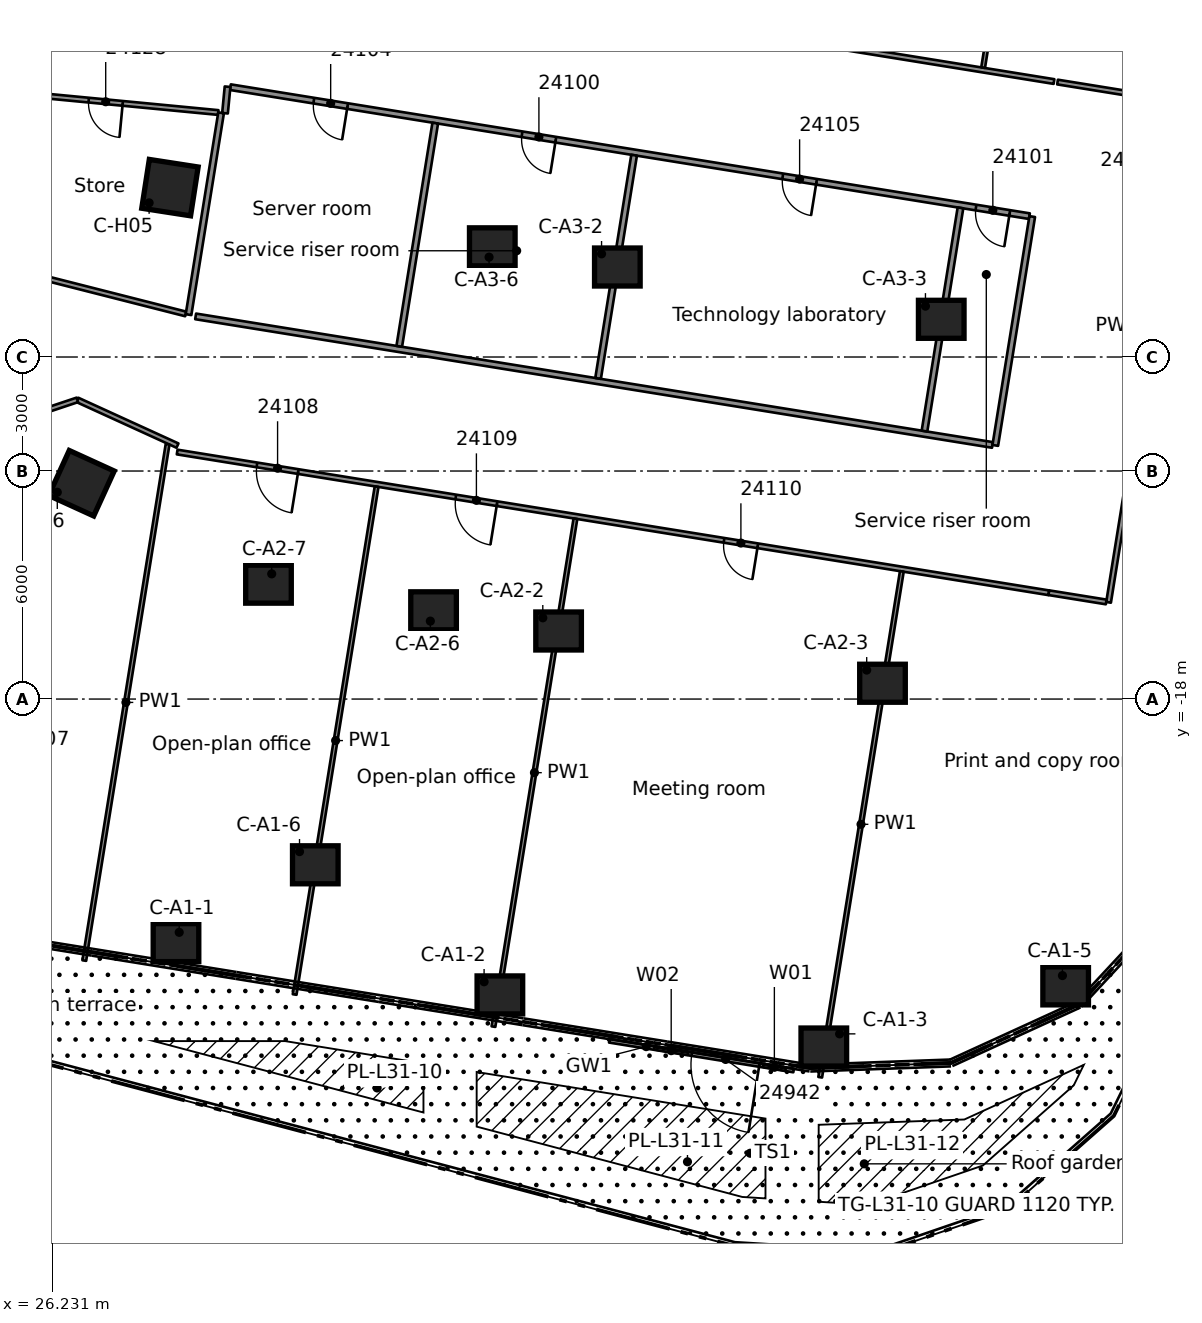
"""IFC4 building model, lengths in metres.
Left out: names, types, materials, properties, quantities, classifications, styles, units other than length and angle.
Written with IfcOpenShell. Run it as: python <this file> out.ifc"""

import sys

from ifc_helpers import new_model, si_unit, direction, frame, frame_2d, origin, origin_2d, place, context, subcontext, project, spatial, rectangle, extrude, element, fill, save


model = new_model("IFC4")
c1 = context("Model", 3, precision=1e-05, world=origin(), true_north=direction((0.0, 1.0)))
c2 = subcontext(c1, "Body", "Model", "MODEL_VIEW")
j1 = project(units=[si_unit("LENGTHUNIT", "METRE"), si_unit("PLANEANGLEUNIT", "RADIAN")], contexts=[c1])
p1 = place(None, origin())
s1 = spatial("IfcSite", under=j1, at=p1, CompositionType="ELEMENT")
p2 = place(p1, origin())
s2 = spatial("IfcBuilding", under=s1, at=p2, CompositionType="ELEMENT")
p3 = place(p2, frame((0.0, 0.0, 123.7)))
s3 = spatial("IfcBuildingStorey", under=s2, at=p3, CompositionType="ELEMENT", Elevation=123.7)
for number, where, z_axis, x_axis in (
    (1, (29.488, -24.409, 0.0), (0.0, 0.0, 1.0), (1.0, 0.0, 0.0)),
    (2, (38.011, -25.785, 0.0), (0.0, 0.0, 1.0), (1.0, 0.0, 0.0)),
    (3, (46.535, -27.156, 0.0), (0.0, 0.0, 1.0), (1.0, 0.0, 0.0)),
    (4, (52.899, -25.547, 0.0), (0.0, 0.0, 1.0), (1.0, 0.0, 0.0)),
    (5, (33.154, -22.361, 0.0), (0.0, 0.0, 1.0), (1.0, 0.0, 0.0)),
    (6, (39.556, -16.209, 0.0), (0.0, 0.0, 1.0), (1.0, 0.0, 0.0)),
    (7, (48.079, -17.584, 0.0), (0.0, 0.0, 1.0), (1.0, 0.0, 0.0)),
    (8, (36.266, -15.678, 0.0), (0.0, 0.0, 1.0), (1.0, 0.0, 0.0)),
    (9, (31.922, -14.977, 0.0), (0.0, 0.0, 1.0), (1.0, 0.0, 0.0)),
    (10, (41.102, -6.632, 0.0), (0.0, 0.0, 1.0), (1.0, 0.0, 0.0)),
    (11, (49.625, -8.008, 0.0), (0.0, 0.0, 1.0), (1.0, 0.0, 0.0)),
    (12, (37.811, -6.101, 0.0), (0.0, 0.0, 1.0), (1.0, 0.0, 0.0)),
):
    element("IfcColumn", number, at=place(p3, frame(where, z_axis=z_axis, x_axis=x_axis)), inside=s3, PredefinedType="COLUMN", context=c2, shape_type="SweptSolid", body=[
        extrude(rectangle(XDim=1.2, YDim=1.0, at=origin_2d()), origin(), (0.0, 0.0, 1.0), 3.5),
    ])
for number, where, z_axis, x_axis in (
    (13, (29.329, -4.543, 0.0), (0.0, 0.0, 1.0), (0.988, -0.153, 0.0)),
    (14, (27.001, -12.321, 0.0), (0.0, 0.0, 1.0), (0.91, -0.415, 0.0)),
):
    element("IfcColumn", number, at=place(p3, frame(where, z_axis=z_axis, x_axis=x_axis)), inside=s3, PredefinedType="COLUMN", context=c2, shape_type="SweptSolid", body=[
        extrude(rectangle(XDim=1.3, YDim=1.3, at=origin_2d()), origin(), (0.0, 0.0, 1.0), 3.5),
    ])
p4 = place(p3, frame((45.74, -27.771, 0.0), z_axis=(0.0, 0.0, 1.0), x_axis=(-0.987233559184, 0.159279313223, 0.0)))
e15 = element("IfcWall", 15, at=p4, inside=s3, PredefinedType="STANDARD", context=c2, shape_type="SweptSolid", body=[
    extrude(rectangle(XDim=4.913, YDim=0.1, at=frame_2d((2.456, 0.0))), origin(), (0.0, 0.0, 1.0), 3.1),
])
p5 = place(p4, frame((0.913, 0.0, 0.0)))
e16 = element("IfcOpeningElement", 16, at=p5, cuts=e15, PredefinedType="OPENING", context=c2, shape_type="SweptSolid", body=[
    extrude(rectangle(XDim=1.8, YDim=2.4, at=frame_2d((0.9, 1.2))), frame((0.0, 0.06, 0.0), z_axis=(0.0, -1.0, 0.0), x_axis=(1.0, 0.0, 0.0)), (0.0, 0.0, 1.0), 0.12),
])
p6 = place(p4, frame((0.213, 0.0, 0.0)))
e17 = element("IfcOpeningElement", 17, at=p6, cuts=e15, PredefinedType="OPENING", context=c2, shape_type="SweptSolid", body=[
    extrude(rectangle(XDim=0.6, YDim=2.4, at=frame_2d((0.3, 1.2))), frame((0.0, 0.06, 0.0), z_axis=(0.0, -1.0, 0.0), x_axis=(1.0, 0.0, 0.0)), (0.0, 0.0, 1.0), 0.12),
])
p7 = place(p4, frame((2.813, 0.0, 0.0)))
e18 = element("IfcOpeningElement", 18, at=p7, cuts=e15, PredefinedType="OPENING", context=c2, shape_type="SweptSolid", body=[
    extrude(rectangle(XDim=0.9, YDim=2.4, at=frame_2d((0.45, 1.2))), frame((0.0, 0.06, 0.0), z_axis=(0.0, -1.0, 0.0), x_axis=(1.0, 0.0, 0.0)), (0.0, 0.0, 1.0), 0.12),
])
p8 = place(p3, frame((29.527, -11.331, 0.0), z_axis=(0.0, 0.0, 1.0), x_axis=(-0.909663775555, 0.415345417024, 0.0)))
e19 = element("IfcWall", 19, at=p8, inside=s3, PredefinedType="PARTITIONING", context=c2, shape_type="SweptSolid", body=[
    extrude(rectangle(XDim=2.897, YDim=0.125, at=frame_2d((1.448, 0.0))), origin(), (0.0, 0.0, 1.0), 3.08),
])
p9 = place(p3, frame((29.745, -7.867, 0.0), z_axis=(0.0, 0.0, 1.0), x_axis=(-0.969150714626, 0.24646884659, 0.0)))
e20 = element("IfcWall", 20, at=p9, inside=s3, PredefinedType="PARTITIONING", context=c2, shape_type="SweptSolid", body=[
    extrude(rectangle(XDim=3.883, YDim=0.125, at=frame_2d((1.941, 0.0))), origin(), (0.0, 0.0, 1.0), 3.08),
])
p10 = place(p3, frame((52.457, -15.204, 0.0), z_axis=(0.0, 0.0, 1.0), x_axis=(-0.987211158264, 0.159418094953, 0.0)))
e21 = element("IfcWall", 21, at=p10, inside=s3, PredefinedType="PARTITIONING", context=c2, shape_type="SweptSolid", body=[
    extrude(rectangle(XDim=23.235, YDim=0.125, at=frame_2d((11.618, 0.0))), origin(), (0.0, 0.0, 1.0), 3.08),
])
p11 = place(p10, frame((20.009, 0.0, 0.0)))
e22 = element("IfcOpeningElement", 22, at=p11, cuts=e21, PredefinedType="OPENING", context=c2, shape_type="SweptSolid", body=[
    extrude(rectangle(XDim=1.1, YDim=2.1, at=frame_2d((0.55, 1.05))), frame((0.0, 0.073, 0.0), z_axis=(0.0, -1.0, 0.0), x_axis=(1.0, 0.0, 0.0)), (0.0, 0.0, 1.0), 0.145),
])
p12 = place(p10, frame((14.709, 0.0, 0.0)))
e23 = element("IfcOpeningElement", 23, at=p12, cuts=e21, PredefinedType="OPENING", context=c2, shape_type="SweptSolid", body=[
    extrude(rectangle(XDim=1.1, YDim=2.1, at=frame_2d((0.55, 1.05))), frame((0.0, 0.073, 0.0), z_axis=(0.0, -1.0, 0.0), x_axis=(1.0, 0.0, 0.0)), (0.0, 0.0, 1.0), 0.145),
])
p13 = place(p10, frame((7.759, 0.0, 0.0)))
e24 = element("IfcOpeningElement", 24, at=p13, cuts=e21, PredefinedType="OPENING", context=c2, shape_type="SweptSolid", body=[
    extrude(rectangle(XDim=0.9, YDim=2.1, at=frame_2d((0.45, 1.05))), frame((0.0, 0.073, 0.0), z_axis=(0.0, -1.0, 0.0), x_axis=(1.0, 0.0, 0.0)), (0.0, 0.0, 1.0), 0.145),
])
p14 = place(p3, frame((30.005, -7.931, 0.0), z_axis=(0.0, 0.0, 1.0), x_axis=(0.987232842174, -0.15928375728, 0.0)))
e25 = element("IfcWall", 25, at=p14, inside=s3, PredefinedType="PARTITIONING", context=c2, shape_type="SweptSolid", body=[
    extrude(rectangle(XDim=21.239, YDim=0.15, at=frame_2d((10.62, 0.0))), origin(), (0.0, 0.0, 1.0), 3.08),
])
p15 = place(p3, frame((51.945, -5.294, 0.0), z_axis=(0.0, 0.0, 1.0), x_axis=(-0.98722094224, 0.159357494967, 0.0)))
e26 = element("IfcWall", 26, at=p15, inside=s3, PredefinedType="PARTITIONING", context=c2, shape_type="SweptSolid", body=[
    extrude(rectangle(XDim=21.298, YDim=0.15, at=frame_2d((10.649, 0.0))), origin(), (0.0, 0.0, 1.0), 3.08),
])
p16 = place(p15, frame((12.624, 0.0, 0.0)))
e27 = element("IfcOpeningElement", 27, at=p16, cuts=e26, PredefinedType="OPENING", context=c2, shape_type="SweptSolid", body=[
    extrude(rectangle(XDim=0.9, YDim=2.1, at=frame_2d((0.45, 1.05))), frame((0.0, 0.085, 0.0), z_axis=(0.0, -1.0, 0.0), x_axis=(1.0, 0.0, 0.0)), (0.0, 0.0, 1.0), 0.17),
])
p17 = place(p15, frame((0.525, 0.0, 0.0)))
e28 = element("IfcOpeningElement", 28, at=p17, cuts=e26, PredefinedType="OPENING", context=c2, shape_type="SweptSolid", body=[
    extrude(rectangle(XDim=0.9, YDim=2.1, at=frame_2d((0.45, 1.05))), frame((0.0, 0.085, 0.0), z_axis=(0.0, -1.0, 0.0), x_axis=(1.0, 0.0, 0.0)), (0.0, 0.0, 1.0), 0.17),
])
p18 = place(p15, frame((18.175, 0.0, 0.0)))
e29 = element("IfcOpeningElement", 29, at=p18, cuts=e26, PredefinedType="OPENING", context=c2, shape_type="SweptSolid", body=[
    extrude(rectangle(XDim=0.9, YDim=2.1, at=frame_2d((0.45, 1.05))), frame((0.0, 0.085, 0.0), z_axis=(0.0, -1.0, 0.0), x_axis=(1.0, 0.0, 0.0)), (0.0, 0.0, 1.0), 0.17),
])
p19 = place(p15, frame((5.675, 0.0, 0.0)))
e30 = element("IfcOpeningElement", 30, at=p19, cuts=e26, PredefinedType="OPENING", context=c2, shape_type="SweptSolid", body=[
    extrude(rectangle(XDim=0.9, YDim=2.1, at=frame_2d((0.45, 1.05))), frame((0.0, 0.085, 0.0), z_axis=(0.0, -1.0, 0.0), x_axis=(1.0, 0.0, 0.0)), (0.0, 0.0, 1.0), 0.17),
])
p20 = place(p3, frame((33.0, 1.411, 0.0), z_axis=(0.0, 0.0, 1.0), x_axis=(0.987218652985, -0.159371676275, 0.0)))
e31 = element("IfcWall", 31, at=p20, inside=s3, PredefinedType="PARTITIONING", context=c2, shape_type="SweptSolid", body=[
    extrude(rectangle(XDim=19.846, YDim=0.125, at=frame_2d((9.923, 0.0))), origin(), (0.0, 0.0, 1.0), 3.08),
])
p21 = place(p20, frame((1.6, 0.0, 0.0)))
e32 = element("IfcOpeningElement", 32, at=p21, cuts=e31, PredefinedType="OPENING", context=c2, shape_type="SweptSolid", body=[
    extrude(rectangle(XDim=0.9, YDim=2.1, at=frame_2d((0.45, 1.05))), frame((0.0, 0.073, 0.0), z_axis=(0.0, -1.0, 0.0), x_axis=(1.0, 0.0, 0.0)), (0.0, 0.0, 1.0), 0.145),
])
p22 = place(p20, frame((13.096, 0.0, 0.0)))
e33 = element("IfcOpeningElement", 33, at=p22, cuts=e31, PredefinedType="OPENING", context=c2, shape_type="SweptSolid", body=[
    extrude(rectangle(XDim=1.1, YDim=2.1, at=frame_2d((0.55, 1.05))), frame((0.0, 0.073, 0.0), z_axis=(0.0, -1.0, 0.0), x_axis=(1.0, 0.0, 0.0)), (0.0, 0.0, 1.0), 0.145),
])
p23 = place(p3, frame((52.685, -1.765, 0.0), z_axis=(0.0, 0.0, 1.0), x_axis=(0.987209106982, -0.159430797185, 0.0)))
e34 = element("IfcWall", 34, at=p23, inside=s3, PredefinedType="PARTITIONING", context=c2, shape_type="SweptSolid", body=[
    extrude(rectangle(XDim=3.444, YDim=0.125, at=frame_2d((1.722, 0.0))), origin(), (0.0, 0.0, 1.0), 3.08),
])
p24 = place(p3, frame((52.457, -15.202, 0.0), z_axis=(0.0, 0.0, 1.0), x_axis=(0.987264599046, -0.159086804829, 0.0)))
e35 = element("IfcWall", 35, at=p24, inside=s3, PredefinedType="PARTITIONING", context=c2, shape_type="SweptSolid", body=[
    extrude(rectangle(XDim=1.529, YDim=0.125, at=frame_2d((0.764, 0.0))), origin(), (0.0, 0.0, 1.0), 3.08),
])
p25 = place(p3, frame((30.6, -2.567, 0.0), z_axis=(0.0, 0.0, 1.0), x_axis=(-0.995450531819, 0.095279791669, 0.0)))
e36 = element("IfcWall", 36, at=p25, inside=s3, PredefinedType="PARTITIONING", context=c2, shape_type="SweptSolid", body=[
    extrude(rectangle(XDim=9.13, YDim=0.125, at=frame_2d((4.565, 0.0))), origin(), (0.0, 0.0, 1.0), 3.08),
])
p26 = place(p25, frame((2.525, 0.0, 0.0)))
e37 = element("IfcOpeningElement", 37, at=p26, cuts=e36, PredefinedType="OPENING", context=c2, shape_type="SweptSolid", body=[
    extrude(rectangle(XDim=0.9, YDim=2.1, at=frame_2d((0.45, 1.05))), frame((0.0, 0.073, 0.0), z_axis=(0.0, -1.0, 0.0), x_axis=(1.0, 0.0, 0.0)), (0.0, 0.0, 1.0), 0.145),
])
p27 = place(p3, frame((25.672, -10.536, 0.0), z_axis=(0.0, 0.0, 1.0), x_axis=(0.948379197111, 0.317138610841, 0.0)))
e38 = element("IfcWall", 38, at=p27, inside=s3, PredefinedType="PARTITIONING", context=c2, shape_type="SweptSolid", body=[
    extrude(rectangle(XDim=1.286, YDim=0.125, at=frame_2d((0.643, 0.0))), origin(), (0.0, 0.0, 1.0), 3.08),
])
p28 = place(p3, frame((56.147, -2.317, 0.0), z_axis=(0.0, 0.0, 1.0), x_axis=(-0.159220326338, -0.987243074263, 0.0)))
e39 = element("IfcWall", 39, at=p28, inside=s3, PredefinedType="PARTITIONING", context=c2, shape_type="SweptSolid", body=[
    extrude(rectangle(XDim=13.308, YDim=0.125, at=frame_2d((6.654, 0.0))), origin(), (0.0, 0.0, 1.0), 3.08),
])
p29 = place(p28, frame((9.508, 0.0, 0.0)))
e40 = element("IfcOpeningElement", 40, at=p29, cuts=e39, PredefinedType="OPENING", context=c2, shape_type="SweptSolid", body=[
    extrude(rectangle(XDim=0.9, YDim=2.1, at=frame_2d((0.45, 1.05))), frame((0.0, 0.073, 0.0), z_axis=(0.0, -1.0, 0.0), x_axis=(1.0, 0.0, 0.0)), (0.0, 0.0, 1.0), 0.145),
])
p30 = place(p28, frame((2.857, 0.0, 0.0)))
e41 = element("IfcOpeningElement", 41, at=p30, cuts=e39, PredefinedType="OPENING", context=c2, shape_type="SweptSolid", body=[
    extrude(rectangle(XDim=0.9, YDim=2.1, at=frame_2d((0.45, 1.05))), frame((0.0, 0.073, 0.0), z_axis=(0.0, -1.0, 0.0), x_axis=(1.0, 0.0, 0.0)), (0.0, 0.0, 1.0), 0.145),
])
p31 = place(p3, frame((51.047, -11.326, 0.0), z_axis=(0.0, 0.0, 1.0), x_axis=(0.159359551121, 0.987220610333, 0.0)))
e42 = element("IfcWall", 42, at=p31, inside=s3, PredefinedType="PARTITIONING", context=c2, shape_type="SweptSolid", body=[
    extrude(rectangle(XDim=6.099, YDim=0.15, at=frame_2d((3.049, 0.0))), origin(), (0.0, 0.0, 1.0), 3.08),
])
p32 = place(p3, frame((46.44, -27.951, 0.0), z_axis=(0.0, 0.0, 1.0), x_axis=(0.159319546861, 0.987227067086, 0.0)))
e43 = element("IfcWall", 43, at=p32, inside=s3, PredefinedType="PARTITIONING", context=c2, shape_type="SweptSolid", body=[
    extrude(rectangle(XDim=13.482, YDim=0.1, at=frame_2d((6.741, 0.0))), origin(), (0.0, 0.0, 1.0), 3.08),
])
p33 = place(p3, frame((49.184, -10.949, 0.0), z_axis=(0.0, 0.0, 1.0), x_axis=(0.159192439694, 0.987247571354, 0.0)))
e44 = element("IfcWall", 44, at=p33, inside=s3, PredefinedType="PARTITIONING", context=c2, shape_type="SweptSolid", body=[
    extrude(rectangle(XDim=5.949, YDim=0.15, at=frame_2d((2.975, 0.0))), origin(), (0.0, 0.0, 1.0), 3.08),
])
p34 = place(p3, frame((50.727, -1.385, 0.0), z_axis=(0.0, 0.0, 1.0), x_axis=(0.159328091928, 0.987225688038, 0.0)))
e45 = element("IfcWall", 45, at=p34, inside=s3, PredefinedType="PARTITIONING", context=c2, shape_type="SweptSolid", body=[
    extrude(rectangle(XDim=13.481, YDim=0.1, at=frame_2d((6.741, 0.0))), origin(), (0.0, 0.0, 1.0), 3.08),
])
p35 = place(p3, frame((37.842, -26.619, 0.0), z_axis=(0.0, 0.0, 1.0), x_axis=(0.159340172949, 0.98722373821, 0.0)))
e46 = element("IfcWall", 46, at=p35, inside=s3, PredefinedType="PARTITIONING", context=c2, shape_type="SweptSolid", body=[
    extrude(rectangle(XDim=13.537, YDim=0.1, at=frame_2d((6.769, 0.0))), origin(), (0.0, 0.0, 1.0), 3.08),
])
p36 = place(p3, frame((40.595, -9.563, 0.0), z_axis=(0.0, 0.0, 1.0), x_axis=(0.159352431511, 0.987221759572, 0.0)))
e47 = element("IfcWall", 47, at=p36, inside=s3, PredefinedType="PARTITIONING", context=c2, shape_type="SweptSolid", body=[
    extrude(rectangle(XDim=5.949, YDim=0.15, at=frame_2d((2.975, 0.0))), origin(), (0.0, 0.0, 1.0), 3.08),
])
p37 = place(p3, frame((32.61, -25.774, 0.0), z_axis=(0.0, 0.0, 1.0), x_axis=(0.159351521754, 0.98722190642, 0.0)))
e48 = element("IfcWall", 48, at=p37, inside=s3, PredefinedType="PARTITIONING", context=c2, shape_type="SweptSolid", body=[
    extrude(rectangle(XDim=13.536, YDim=0.1, at=frame_2d((6.768, 0.0))), origin(), (0.0, 0.0, 1.0), 3.08),
])
p38 = place(p3, frame((35.363, -8.719, 0.0), z_axis=(0.0, 0.0, 1.0), x_axis=(0.159192439694, 0.987247571354, 0.0)))
e49 = element("IfcWall", 49, at=p38, inside=s3, PredefinedType="PARTITIONING", context=c2, shape_type="SweptSolid", body=[
    extrude(rectangle(XDim=5.949, YDim=0.15, at=frame_2d((2.975, 0.0))), origin(), (0.0, 0.0, 1.0), 3.08),
])
p39 = place(p3, frame((27.075, -24.881, 0.0), z_axis=(0.0, 0.0, 1.0), x_axis=(0.159301605387, 0.98722996233, 0.0)))
e50 = element("IfcWall", 50, at=p39, inside=s3, PredefinedType="PARTITIONING", context=c2, shape_type="SweptSolid", body=[
    extrude(rectangle(XDim=13.761, YDim=0.1, at=frame_2d((6.88, 0.0))), origin(), (0.0, 0.0, 1.0), 3.08),
])
p40 = place(p3, frame((29.818, -7.885, 0.0), z_axis=(0.0, 0.0, 1.0), x_axis=(0.159318061913, 0.987227306727, 0.0)))
e51 = element("IfcWall", 51, at=p40, inside=s3, PredefinedType="PARTITIONING", context=c2, shape_type="SweptSolid", body=[
    extrude(rectangle(XDim=5.379, YDim=0.15, at=frame_2d((2.689, 0.0))), origin(), (0.0, 0.0, 1.0), 3.08),
])
p41 = place(p3, frame((30.778, -2.585, 0.0), z_axis=(0.0, 0.0, 1.0), x_axis=(0.095533028174, 0.995426260718, 0.0)))
e52 = element("IfcWall", 52, at=p41, inside=s3, PredefinedType="PARTITIONING", context=c2, shape_type="SweptSolid", body=[
    extrude(rectangle(XDim=0.7, YDim=0.15, at=frame_2d((0.35, 0.0))), origin(), (0.0, 0.0, 1.0), 3.08),
])
p42 = place(p5, origin())
e53 = element("IfcDoor", 53, at=p42, inside=s3, OperationType="DOUBLE_DOOR_SINGLE_SWING", PredefinedType="DOOR", context=c2, shape_type="SweptSolid", body=[
    extrude(rectangle(XDim=1.8, YDim=2.4, at=frame_2d((0.9, 1.2))), frame((0.0, 0.025, 0.0), z_axis=(0.0, -1.0, 0.0), x_axis=(1.0, 0.0, 0.0)), (0.0, 0.0, 1.0), 0.05),
])
fill(e16, e53)
p43 = place(p6, origin())
e54 = element("IfcWindow", 54, at=p43, inside=s3, PartitioningType="SINGLE_PANEL", PredefinedType="WINDOW", context=c2, shape_type="SweptSolid", body=[
    extrude(rectangle(XDim=0.6, YDim=2.4, at=frame_2d((0.3, 1.2))), frame((0.0, 0.03, 0.0), z_axis=(0.0, -1.0, 0.0), x_axis=(1.0, 0.0, 0.0)), (0.0, 0.0, 1.0), 0.06),
])
fill(e17, e54)
p44 = place(p7, origin())
e55 = element("IfcWindow", 55, at=p44, inside=s3, PartitioningType="SINGLE_PANEL", PredefinedType="WINDOW", context=c2, shape_type="SweptSolid", body=[
    extrude(rectangle(XDim=0.9, YDim=2.4, at=frame_2d((0.45, 1.2))), frame((0.0, 0.03, 0.0), z_axis=(0.0, -1.0, 0.0), x_axis=(1.0, 0.0, 0.0)), (0.0, 0.0, 1.0), 0.06),
])
fill(e18, e55)
p45 = place(p16, origin())
e56 = element("IfcDoor", 56, at=p45, inside=s3, OperationType="SINGLE_SWING_RIGHT", PredefinedType="DOOR", context=c2, shape_type="SweptSolid", body=[
    extrude(rectangle(XDim=0.9, YDim=2.1, at=frame_2d((0.45, 1.05))), frame((0.0, 0.025, 0.0), z_axis=(0.0, -1.0, 0.0), x_axis=(1.0, 0.0, 0.0)), (0.0, 0.0, 1.0), 0.05),
])
fill(e27, e56)
p46 = place(p17, origin())
e57 = element("IfcDoor", 57, at=p46, inside=s3, OperationType="SINGLE_SWING_LEFT", PredefinedType="DOOR", context=c2, shape_type="SweptSolid", body=[
    extrude(rectangle(XDim=0.9, YDim=2.1, at=frame_2d((0.45, 1.05))), frame((0.0, 0.025, 0.0), z_axis=(0.0, -1.0, 0.0), x_axis=(1.0, 0.0, 0.0)), (0.0, 0.0, 1.0), 0.05),
])
fill(e28, e57)
p47 = place(p18, origin())
e58 = element("IfcDoor", 58, at=p47, inside=s3, OperationType="SINGLE_SWING_RIGHT", PredefinedType="DOOR", context=c2, shape_type="SweptSolid", body=[
    extrude(rectangle(XDim=0.9, YDim=2.1, at=frame_2d((0.45, 1.05))), frame((0.0, 0.025, 0.0), z_axis=(0.0, -1.0, 0.0), x_axis=(1.0, 0.0, 0.0)), (0.0, 0.0, 1.0), 0.05),
])
fill(e29, e58)
p48 = place(p19, origin())
e59 = element("IfcDoor", 59, at=p48, inside=s3, OperationType="SINGLE_SWING_LEFT", PredefinedType="DOOR", context=c2, shape_type="SweptSolid", body=[
    extrude(rectangle(XDim=0.9, YDim=2.1, at=frame_2d((0.45, 1.05))), frame((0.0, 0.025, 0.0), z_axis=(0.0, -1.0, 0.0), x_axis=(1.0, 0.0, 0.0)), (0.0, 0.0, 1.0), 0.05),
])
fill(e30, e59)
p49 = place(p11, origin())
e60 = element("IfcDoor", 60, at=p49, inside=s3, OperationType="SINGLE_SWING_RIGHT", PredefinedType="DOOR", context=c2, shape_type="SweptSolid", body=[
    extrude(rectangle(XDim=1.1, YDim=2.1, at=frame_2d((0.55, 1.05))), frame((0.0, 0.025, 0.0), z_axis=(0.0, -1.0, 0.0), x_axis=(1.0, 0.0, 0.0)), (0.0, 0.0, 1.0), 0.05),
])
fill(e22, e60)
p50 = place(p12, origin())
e61 = element("IfcDoor", 61, at=p50, inside=s3, OperationType="SINGLE_SWING_RIGHT", PredefinedType="DOOR", context=c2, shape_type="SweptSolid", body=[
    extrude(rectangle(XDim=1.1, YDim=2.1, at=frame_2d((0.55, 1.05))), frame((0.0, 0.025, 0.0), z_axis=(0.0, -1.0, 0.0), x_axis=(1.0, 0.0, 0.0)), (0.0, 0.0, 1.0), 0.05),
])
fill(e23, e61)
p51 = place(p13, origin())
e62 = element("IfcDoor", 62, at=p51, inside=s3, OperationType="SINGLE_SWING_LEFT", PredefinedType="DOOR", context=c2, shape_type="SweptSolid", body=[
    extrude(rectangle(XDim=0.9, YDim=2.1, at=frame_2d((0.45, 1.05))), frame((0.0, 0.025, 0.0), z_axis=(0.0, -1.0, 0.0), x_axis=(1.0, 0.0, 0.0)), (0.0, 0.0, 1.0), 0.05),
])
fill(e24, e62)
p52 = place(p26, origin())
e63 = element("IfcDoor", 63, at=p52, inside=s3, OperationType="SINGLE_SWING_LEFT", PredefinedType="DOOR", context=c2, shape_type="SweptSolid", body=[
    extrude(rectangle(XDim=0.9, YDim=2.1, at=frame_2d((0.45, 1.05))), frame((0.0, 0.025, 0.0), z_axis=(0.0, -1.0, 0.0), x_axis=(1.0, 0.0, 0.0)), (0.0, 0.0, 1.0), 0.05),
])
fill(e37, e63)
save(model, sys.argv[1])
